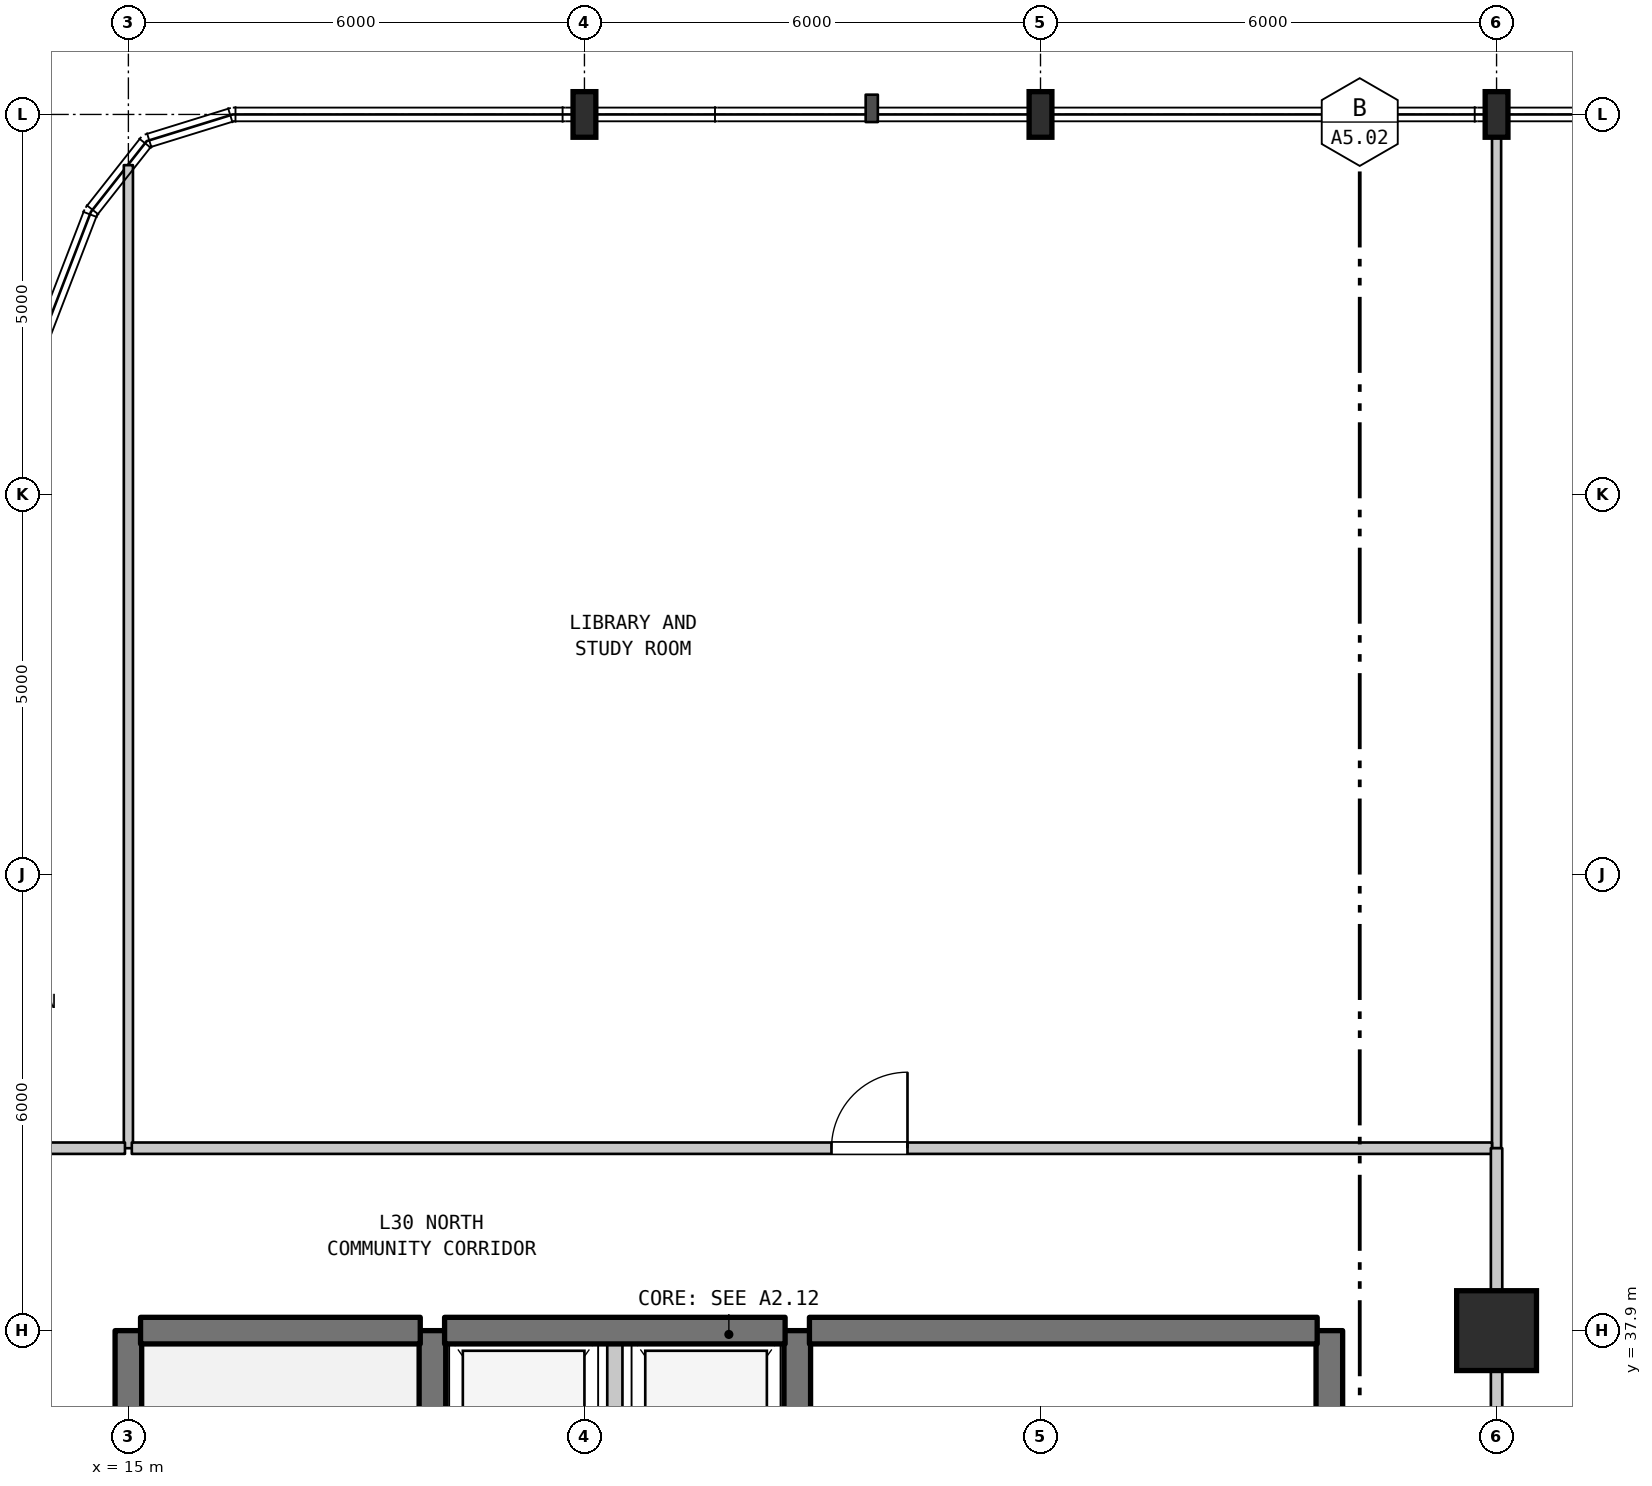
"""IFC4 building model, lengths in metres.
Left out: names, types, materials, properties, quantities, classifications, styles, units other than length and angle.
Written with IfcOpenShell. Run it as: python <this file> out.ifc"""

import sys

from ifc_helpers import new_model, si_unit, direction, frame, frame_2d, origin, origin_2d, place, context, subcontext, project, spatial, rectangle, i_section, extrude, element, fill, save


model = new_model("IFC4")
c1 = context("Model", 3, precision=1e-05, world=origin(), true_north=direction((0.0, 1.0)))
c2 = subcontext(c1, "Body", "Model", "MODEL_VIEW")
j1 = project(units=[si_unit("LENGTHUNIT", "METRE"), si_unit("PLANEANGLEUNIT", "RADIAN")], contexts=[c1])
p1 = place(None, origin())
s1 = spatial("IfcSite", under=j1, at=p1, CompositionType="ELEMENT")
p2 = place(p1, origin())
s2 = spatial("IfcBuilding", under=s1, at=p2, CompositionType="ELEMENT")
p3 = place(p2, frame((0.0, 0.0, 125.3)))
s3 = spatial("IfcBuildingStorey", under=s2, at=p3, CompositionType="ELEMENT", Elevation=125.3)
for number, where, z_axis, x_axis in (
    (1, (21.0, 53.9, 0.0), (0.0, 0.0, 1.0), (1.0, 0.0, 0.0)),
    (2, (27.0, 53.9, 0.0), (0.0, 0.0, 1.0), (1.0, 0.0, 0.0)),
):
    element("IfcColumn", number, at=place(p3, frame(where, z_axis=z_axis, x_axis=x_axis)), inside=s3, PredefinedType="COLUMN", context=c2, shape_type="SweptSolid", body=[
        extrude(i_section(OverallWidth=0.3, OverallDepth=0.6, WebThickness=0.015, FlangeThickness=0.03, FilletRadius=0.027, at=origin_2d()), origin(), (0.0, 0.0, 1.0), 4.5),
    ])
p4 = place(p3, frame((33.0, 37.9, 0.0), z_axis=(0.0, 0.0, 1.0), x_axis=(1.0, 0.0, 0.0)))
e3 = element("IfcColumn", 3, at=p4, inside=s3, PredefinedType="COLUMN", context=c2, shape_type="SweptSolid", body=[
    extrude(rectangle(XDim=1.05, YDim=1.05, at=origin_2d()), origin(), (0.0, 0.0, 1.0), 4.5),
])
p5 = place(p3, frame((33.0, 53.9, 0.0), z_axis=(0.0, 0.0, 1.0), x_axis=(1.0, 0.0, 0.0)))
e4 = element("IfcColumn", 4, at=p5, inside=s3, PredefinedType="COLUMN", context=c2, shape_type="SweptSolid", body=[
    extrude(i_section(OverallWidth=0.3, OverallDepth=0.6, WebThickness=0.015, FlangeThickness=0.03, FilletRadius=0.027, at=origin_2d()), origin(), (0.0, 0.0, 1.0), 4.5),
])
p6 = place(p3, frame((15.0, 31.1, 0.0), z_axis=(0.0, 0.0, 1.0), x_axis=(0.0, 1.0, 0.0)))
e5 = element("IfcWall", 5, at=p6, inside=s3, PredefinedType="SHEAR", context=c2, shape_type="SweptSolid", body=[
    extrude(rectangle(XDim=6.8, YDim=0.35, at=frame_2d((3.4, 0.0))), origin(), (0.0, 0.0, 1.0), 4.185),
])
p7 = place(p3, frame((15.0, 40.3, 0.0), z_axis=(0.0, 0.0, 1.0), x_axis=(0.0, 1.0, 0.0)))
e6 = element("IfcWall", 6, at=p7, inside=s3, PredefinedType="PARTITIONING", context=c2, shape_type="SweptSolid", body=[
    extrude(rectangle(XDim=12.933, YDim=0.12, at=frame_2d((6.466, 0.0))), origin(), (0.0, 0.0, 1.0), 4.185),
])
p8 = place(p3, frame((19.0, 35.0, 0.0), z_axis=(0.0, 0.0, 1.0), x_axis=(0.0, 1.0, 0.0)))
e7 = element("IfcWall", 7, at=p8, inside=s3, PredefinedType="SHEAR", context=c2, shape_type="SweptSolid", body=[
    extrude(rectangle(XDim=2.9, YDim=0.35, at=frame_2d((1.45, 0.0))), origin(), (0.0, 0.0, 1.0), 4.185),
])
p9 = place(p3, frame((21.4, 35.0, 0.0), z_axis=(0.0, 0.0, 1.0), x_axis=(0.0, 1.0, 0.0)))
e8 = element("IfcWall", 8, at=p9, inside=s3, PredefinedType="STANDARD", context=c2, shape_type="SweptSolid", body=[
    extrude(rectangle(XDim=2.9, YDim=0.2, at=frame_2d((1.45, 0.0))), origin(), (0.0, 0.0, 1.0), 4.185),
])
for number, where, z_axis, x_axis in (
    (9, (23.8, 35.0, 0.0), (0.0, 0.0, 1.0), (0.0, 1.0, 0.0)),
    (10, (30.8, 35.0, 0.0), (0.0, 0.0, 1.0), (0.0, 1.0, 0.0)),
):
    element("IfcWall", number, at=place(p3, frame(where, z_axis=z_axis, x_axis=x_axis)), inside=s3, PredefinedType="SHEAR", context=c2, shape_type="SweptSolid", body=[
        extrude(rectangle(XDim=2.9, YDim=0.35, at=frame_2d((1.45, 0.0))), origin(), (0.0, 0.0, 1.0), 4.185),
    ])
p10 = place(p3, frame((33.0, 27.9, 0.0), z_axis=(0.0, 0.0, 1.0), x_axis=(0.0, 1.0, 0.0)))
e11 = element("IfcWall", 11, at=p10, inside=s3, PredefinedType="STANDARD", context=c2, shape_type="SweptSolid", body=[
    extrude(rectangle(XDim=10.0, YDim=0.15, at=frame_2d((5.0, 0.0))), origin(), (0.0, 0.0, 1.0), 3.685),
])
p11 = place(p3, frame((33.0, 40.3, 0.0), z_axis=(0.0, 0.0, 1.0), x_axis=(0.0, 1.0, 0.0)))
e12 = element("IfcWall", 12, at=p11, inside=s3, PredefinedType="PARTITIONING", context=c2, shape_type="SweptSolid", body=[
    extrude(rectangle(XDim=13.59, YDim=0.12, at=frame_2d((6.795, 0.0))), origin(), (0.0, 0.0, 1.0), 3.585),
])
p12 = place(p3, frame((15.16, 37.9, 0.0), z_axis=(0.0, 0.0, 1.0), x_axis=(1.0, 0.0, 0.0)))
e13 = element("IfcWall", 13, at=p12, inside=s3, PredefinedType="SHEAR", context=c2, shape_type="SweptSolid", body=[
    extrude(rectangle(XDim=3.68, YDim=0.35, at=frame_2d((1.84, 0.0))), origin(), (0.0, 0.0, 1.0), 4.185),
])
p13 = place(p3, frame((19.16, 37.9, 0.0), z_axis=(0.0, 0.0, 1.0), x_axis=(1.0, 0.0, 0.0)))
e14 = element("IfcWall", 14, at=p13, inside=s3, PredefinedType="SHEAR", context=c2, shape_type="SweptSolid", body=[
    extrude(rectangle(XDim=4.48, YDim=0.35, at=frame_2d((2.24, 0.0))), origin(), (0.0, 0.0, 1.0), 4.185),
])
p14 = place(p3, frame((23.96, 37.9, 0.0), z_axis=(0.0, 0.0, 1.0), x_axis=(1.0, 0.0, 0.0)))
e15 = element("IfcWall", 15, at=p14, inside=s3, PredefinedType="SHEAR", context=c2, shape_type="SweptSolid", body=[
    extrude(rectangle(XDim=6.68, YDim=0.35, at=frame_2d((3.34, 0.0))), origin(), (0.0, 0.0, 1.0), 4.185),
])
p15 = place(p3, frame((12.66, 40.3, 0.0), z_axis=(0.0, 0.0, 1.0), x_axis=(1.0, 0.0, 0.0)))
e16 = element("IfcWall", 16, at=p15, inside=s3, PredefinedType="STANDARD", context=c2, shape_type="SweptSolid", body=[
    extrude(rectangle(XDim=2.295, YDim=0.15, at=frame_2d((1.147, 0.0))), origin(), (0.0, 0.0, 1.0), 4.185),
])
p16 = place(p3, frame((15.045, 40.3, 0.0), z_axis=(0.0, 0.0, 1.0), x_axis=(1.0, 0.0, 0.0)))
e17 = element("IfcWall", 17, at=p16, inside=s3, PredefinedType="STANDARD", context=c2, shape_type="SweptSolid", body=[
    extrude(rectangle(XDim=17.895, YDim=0.15, at=frame_2d((8.948, 0.0))), origin(), (0.0, 0.0, 1.0), 4.185),
])
p17 = place(p16, frame((9.205, 0.0, 0.0)))
e18 = element("IfcOpeningElement", 18, at=p17, cuts=e17, PredefinedType="OPENING", context=c2, shape_type="SweptSolid", body=[
    extrude(rectangle(XDim=1.0, YDim=2.15, at=frame_2d((0.5, 1.075))), frame((0.0, 0.085, 0.0), z_axis=(0.0, -1.0, 0.0), x_axis=(1.0, 0.0, 0.0)), (0.0, 0.0, 1.0), 0.17),
])
p18 = place(p3, frame((33.0, 37.9, 0.0), z_axis=(0.0, 0.0, 1.0), x_axis=(0.0, 1.0, 0.0)))
e19 = element("IfcWall", 19, at=p18, inside=s3, PredefinedType="STANDARD", context=c2, shape_type="SweptSolid", body=[
    extrude(rectangle(XDim=2.4, YDim=0.15, at=frame_2d((1.2, 0.0))), origin(), (0.0, 0.0, 1.0), 3.585),
])
p19 = place(p17, origin())
e20 = element("IfcDoor", 20, at=p19, inside=s3, OperationType="SINGLE_SWING_RIGHT", PredefinedType="DOOR", context=c2, shape_type="SweptSolid", body=[
    extrude(rectangle(XDim=1.0, YDim=2.15, at=frame_2d((0.5, 1.075))), frame((0.0, 0.025, 0.0), z_axis=(0.0, -1.0, 0.0), x_axis=(1.0, 0.0, 0.0)), (0.0, 0.0, 1.0), 0.05),
])
fill(e18, e20)
save(model, sys.argv[1])
